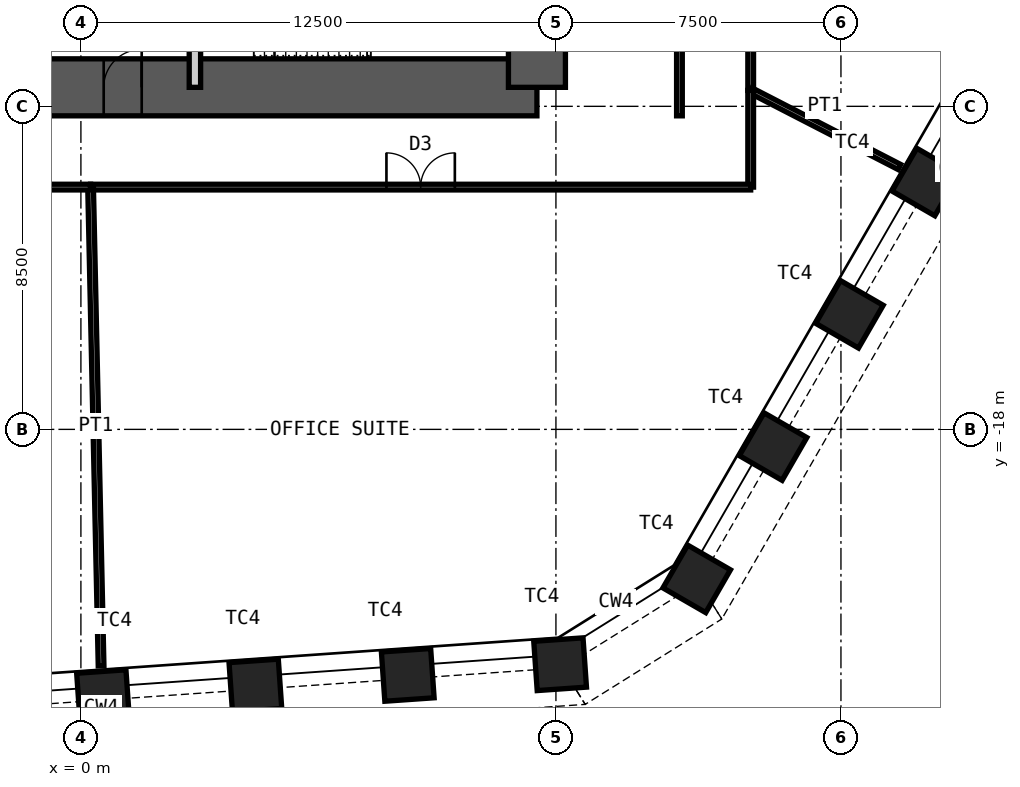
"""IFC4 building model, lengths in metres.
Left out: names, types, materials, properties, quantities, classifications, styles, units other than length and angle.
Written with IfcOpenShell. Run it as: python <this file> out.ifc"""

import sys

from ifc_helpers import new_model, si_unit, direction, frame, frame_2d, origin, origin_2d, place, context, subcontext, project, spatial, rectangle, hollow_rectangle, extrude, element, fill, save


model = new_model("IFC4")
c1 = context("Model", 3, precision=1e-05, world=origin(), true_north=direction((0.0, 1.0)))
c2 = subcontext(c1, "Body", "Model", "MODEL_VIEW")
j1 = project(units=[si_unit("LENGTHUNIT", "METRE"), si_unit("PLANEANGLEUNIT", "RADIAN")], contexts=[c1])
p1 = place(None, origin())
s1 = spatial("IfcSite", under=j1, at=p1, CompositionType="ELEMENT")
p2 = place(p1, origin())
s2 = spatial("IfcBuilding", under=s1, at=p2, CompositionType="ELEMENT")
p3 = place(p2, frame((0.0, 0.0, 140.8)))
s3 = spatial("IfcBuildingStorey", under=s2, at=p3, CompositionType="ELEMENT", Elevation=140.8)
for number, where, z_axis, x_axis in (
    (1, (22.233, -11.491, 0.0), (0.0, 0.0, 1.0), (0.5, 0.866, 0.0)),
    (2, (20.223, -14.972, 0.0), (0.0, 0.0, 1.0), (0.5, 0.866, 0.0)),
    (3, (18.214, -18.453, 0.0), (0.0, 0.0, 1.0), (0.5, 0.866, 0.0)),
    (4, (16.204, -21.933, 0.0), (0.0, 0.0, 1.0), (0.5, 0.866, 0.0)),
    (5, (12.61, -24.179, 0.0), (0.0, 0.0, 1.0), (0.998, 0.07, 0.0)),
    (6, (8.601, -24.46, 0.0), (0.0, 0.0, 1.0), (0.998, 0.07, 0.0)),
    (7, (4.592, -24.74, 0.0), (0.0, 0.0, 1.0), (0.998, 0.07, 0.0)),
    (8, (0.582, -25.02, 0.0), (0.0, 0.0, 1.0), (0.998, 0.07, 0.0)),
):
    element("IfcColumn", number, at=place(p3, frame(where, z_axis=z_axis, x_axis=x_axis)), inside=s3, PredefinedType="COLUMN", context=c2, shape_type="SweptSolid", body=[
        extrude(hollow_rectangle(XDim=1.3, YDim=1.3, WallThickness=0.1, at=origin_2d()), origin(), (0.0, 0.0, 1.0), 4.2),
    ])
p4 = place(p3, frame((-12.0, -9.0, 0.0), z_axis=(0.0, 0.0, 1.0), x_axis=(1.0, 0.0, 0.0)))
e9 = element("IfcWall", 9, at=p4, inside=s3, PredefinedType="SHEAR", context=c2, shape_type="SweptSolid", body=[
    extrude(rectangle(XDim=24.0, YDim=1.5, at=frame_2d((12.0, 0.0))), origin(), (0.0, 0.0, 1.0), 4.2),
])
p5 = place(p4, frame((1.35, 0.0, 0.0)))
e10 = element("IfcOpeningElement", 10, at=p5, cuts=e9, PredefinedType="OPENING", context=c2, shape_type="SweptSolid", body=[
    extrude(rectangle(XDim=1.0, YDim=2.1, at=frame_2d((0.5, 1.05))), frame((0.0, 0.76, 0.0), z_axis=(0.0, -1.0, 0.0), x_axis=(1.0, 0.0, 0.0)), (0.0, 0.0, 1.0), 1.52),
])
p6 = place(p4, frame((5.325, 0.0, 0.0)))
e11 = element("IfcOpeningElement", 11, at=p6, cuts=e9, PredefinedType="OPENING", context=c2, shape_type="SweptSolid", body=[
    extrude(rectangle(XDim=1.15, YDim=2.1, at=frame_2d((0.575, 1.05))), frame((0.0, 0.76, 0.0), z_axis=(0.0, -1.0, 0.0), x_axis=(1.0, 0.0, 0.0)), (0.0, 0.0, 1.0), 1.52),
])
p7 = place(p4, frame((12.6, 0.0, 0.0)))
e12 = element("IfcOpeningElement", 12, at=p7, cuts=e9, PredefinedType="OPENING", context=c2, shape_type="SweptSolid", body=[
    extrude(rectangle(XDim=1.0, YDim=2.1, at=frame_2d((0.5, 1.05))), frame((0.0, 0.76, 0.0), z_axis=(0.0, -1.0, 0.0), x_axis=(1.0, 0.0, 0.0)), (0.0, 0.0, 1.0), 1.52),
])
p8 = place(p3, frame((12.0, -9.0, 0.0), z_axis=(0.0, 0.0, 1.0), x_axis=(0.0, 1.0, 0.0)))
e13 = element("IfcWall", 13, at=p8, inside=s3, PredefinedType="SHEAR", context=c2, shape_type="SweptSolid", body=[
    extrude(rectangle(XDim=18.0, YDim=1.5, at=frame_2d((9.0, 0.0))), origin(), (0.0, 0.0, 1.0), 4.2),
])
p9 = place(p8, frame((8.1, 0.0, 0.0)))
e14 = element("IfcOpeningElement", 14, at=p9, cuts=e13, PredefinedType="OPENING", context=c2, shape_type="SweptSolid", body=[
    extrude(rectangle(XDim=1.8, YDim=2.1, at=frame_2d((0.9, 1.05))), frame((0.0, 0.76, 0.0), z_axis=(0.0, -1.0, 0.0), x_axis=(1.0, 0.0, 0.0)), (0.0, 0.0, 1.0), 1.52),
])
p10 = place(p3, frame((3.0, -9.0, 0.0), z_axis=(0.0, 0.0, 1.0), x_axis=(0.0, 1.0, 0.0)))
e15 = element("IfcWall", 15, at=p10, inside=s3, PredefinedType="PARTITIONING", context=c2, shape_type="SweptSolid", body=[
    extrude(rectangle(XDim=3.85, YDim=0.3, at=frame_2d((1.925, 0.0))), origin(), (0.0, 0.0, 1.0), 3.98),
])
p11 = place(p10, frame((1.425, 0.0, 0.0)))
e16 = element("IfcOpeningElement", 16, at=p11, cuts=e15, PredefinedType="OPENING", context=c2, shape_type="SweptSolid", body=[
    extrude(rectangle(XDim=1.0, YDim=2.1, at=frame_2d((0.5, 1.05))), frame((0.0, 0.16, 0.0), z_axis=(0.0, -1.0, 0.0), x_axis=(1.0, 0.0, 0.0)), (0.0, 0.0, 1.0), 0.32),
])
p12 = place(p3, frame((17.625, 10.698, 0.0), z_axis=(0.0, 0.0, 1.0), x_axis=(0.0, -1.0, 0.0)))
e17 = element("IfcWall", 17, at=p12, inside=s3, PredefinedType="PARTITIONING", context=c2, shape_type="SweptSolid", body=[
    extrude(rectangle(XDim=19.778, YDim=0.15, at=frame_2d((9.889, 0.0))), origin(), (0.0, 0.0, 1.0), 4.03),
])
p13 = place(p12, frame((8.989, 0.0, 0.0)))
e18 = element("IfcOpeningElement", 18, at=p13, cuts=e17, PredefinedType="OPENING", context=c2, shape_type="SweptSolid", body=[
    extrude(rectangle(XDim=1.8, YDim=2.4, at=frame_2d((0.9, 1.2))), frame((0.0, 0.085, 0.0), z_axis=(0.0, -1.0, 0.0), x_axis=(1.0, 0.0, 0.0)), (0.0, 0.0, 1.0), 0.17),
])
p14 = place(p3, frame((21.538, -11.096, 0.0), z_axis=(0.0, 0.0, 1.0), x_axis=(-0.888982083501, 0.457941977999, 0.0)))
e19 = element("IfcWall", 19, at=p14, inside=s3, PredefinedType="PARTITIONING", context=c2, shape_type="SweptSolid", body=[
    extrude(rectangle(XDim=4.401, YDim=0.15, at=frame_2d((2.201, 0.0))), origin(), (0.0, 0.0, 1.0), 3.33),
])
p15 = place(p3, frame((17.625, -9.08, 0.0), z_axis=(0.0, 0.0, 1.0), x_axis=(0.0, -1.0, 0.0)))
e20 = element("IfcWall", 20, at=p15, inside=s3, PredefinedType="PARTITIONING", context=c2, shape_type="SweptSolid", body=[
    extrude(rectangle(XDim=2.545, YDim=0.15, at=frame_2d((1.272, 0.0))), origin(), (0.0, 0.0, 1.0), 4.03),
])
p16 = place(p3, frame((17.625, -11.625, 0.0), z_axis=(0.0, 0.0, 1.0), x_axis=(-1.0, 0.0, 0.0)))
e21 = element("IfcWall", 21, at=p16, inside=s3, PredefinedType="PARTITIONING", context=c2, shape_type="SweptSolid", body=[
    extrude(rectangle(XDim=17.37, YDim=0.15, at=frame_2d((8.685, 0.0))), origin(), (0.0, 0.0, 1.0), 4.03),
])
p17 = place(p16, frame((7.785, 0.0, 0.0)))
e22 = element("IfcOpeningElement", 22, at=p17, cuts=e21, PredefinedType="OPENING", context=c2, shape_type="SweptSolid", body=[
    extrude(rectangle(XDim=1.8, YDim=2.4, at=frame_2d((0.9, 1.2))), frame((0.0, 0.085, 0.0), z_axis=(0.0, -1.0, 0.0), x_axis=(1.0, 0.0, 0.0)), (0.0, 0.0, 1.0), 0.17),
])
p18 = place(p3, frame((0.531, -24.222, 0.0), z_axis=(0.0, 0.0, 1.0), x_axis=(-0.021933557026, 0.999759430601, 0.0)))
e23 = element("IfcWall", 23, at=p18, inside=s3, PredefinedType="PARTITIONING", context=c2, shape_type="SweptSolid", body=[
    extrude(rectangle(XDim=12.6, YDim=0.15, at=frame_2d((6.3, 0.0))), origin(), (0.0, 0.0, 1.0), 3.33),
])
p19 = place(p3, frame((0.255, -11.625, 0.0), z_axis=(0.0, 0.0, 1.0), x_axis=(-1.0, 0.0, 0.0)))
e24 = element("IfcWall", 24, at=p19, inside=s3, PredefinedType="PARTITIONING", context=c2, shape_type="SweptSolid", body=[
    extrude(rectangle(XDim=18.332, YDim=0.15, at=frame_2d((9.166, 0.0))), origin(), (0.0, 0.0, 1.0), 4.03),
])
p20 = place(p19, frame((8.266, 0.0, 0.0)))
e25 = element("IfcOpeningElement", 25, at=p20, cuts=e24, PredefinedType="OPENING", context=c2, shape_type="SweptSolid", body=[
    extrude(rectangle(XDim=1.8, YDim=2.4, at=frame_2d((0.9, 1.2))), frame((0.0, 0.085, 0.0), z_axis=(0.0, -1.0, 0.0), x_axis=(1.0, 0.0, 0.0)), (0.0, 0.0, 1.0), 0.17),
])
p21 = place(p3, frame((15.75, -9.75, 0.0), z_axis=(0.0, 0.0, 1.0), x_axis=(0.0, 1.0, 0.0)))
e26 = element("IfcWall", 26, at=p21, inside=s3, PredefinedType="PARTITIONING", context=c2, shape_type="SweptSolid", body=[
    extrude(rectangle(XDim=7.25, YDim=0.15, at=frame_2d((3.625, 0.0))), origin(), (0.0, 0.0, 1.0), 4.03),
])
p22 = place(p7, origin())
e27 = element("IfcDoor", 27, at=p22, inside=s3, OperationType="SINGLE_SWING_LEFT", PredefinedType="DOOR", context=c2, shape_type="SweptSolid", body=[
    extrude(rectangle(XDim=1.0, YDim=2.1, at=frame_2d((0.5, 1.05))), frame((0.0, 0.025, 0.0), z_axis=(0.0, -1.0, 0.0), x_axis=(1.0, 0.0, 0.0)), (0.0, 0.0, 1.0), 0.05),
])
fill(e12, e27)
p23 = place(p17, origin())
e28 = element("IfcDoor", 28, at=p23, inside=s3, OperationType="DOUBLE_DOOR_DOUBLE_SWING", PredefinedType="DOOR", context=c2, shape_type="SweptSolid", body=[
    extrude(rectangle(XDim=1.8, YDim=2.4, at=frame_2d((0.9, 1.2))), frame((0.0, 0.025, 0.0), z_axis=(0.0, -1.0, 0.0), x_axis=(1.0, 0.0, 0.0)), (0.0, 0.0, 1.0), 0.05),
])
fill(e22, e28)
save(model, sys.argv[1])
